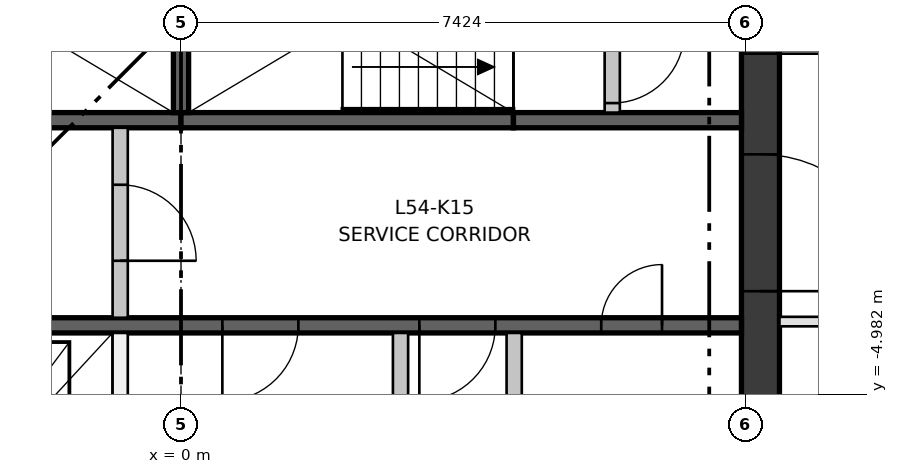
"""IFC4 building model, lengths in metres.
Left out: names, types, materials, properties, quantities, classifications, styles, units other than length and angle.
Written with IfcOpenShell. Run it as: python <this file> out.ifc"""

import sys

from ifc_helpers import new_model, si_unit, direction, frame, frame_2d, origin, place, context, subcontext, project, spatial, rectangle, extrude, element, fill, save


model = new_model("IFC4")
c1 = context("Model", 3, precision=1e-05, world=origin(), true_north=direction((0.0, 1.0)))
c2 = subcontext(c1, "Body", "Model", "MODEL_VIEW")
j1 = project(units=[si_unit("LENGTHUNIT", "METRE"), si_unit("PLANEANGLEUNIT", "RADIAN")], contexts=[c1])
p1 = place(None, origin())
s1 = spatial("IfcSite", under=j1, at=p1, CompositionType="ELEMENT")
p2 = place(p1, origin())
s2 = spatial("IfcBuilding", under=s1, at=p2, CompositionType="ELEMENT")
p3 = place(p2, frame((0.0, 0.0, 201.05)))
s3 = spatial("IfcBuildingStorey", under=s2, at=p3, CompositionType="ELEMENT", Elevation=201.05)
p4 = place(p3, frame((7.624, -7.374, 0.0), z_axis=(0.0, 0.0, 1.0), x_axis=(0.0, 1.0, 0.0)))
e1 = element("IfcWall", 1, at=p4, inside=s3, PredefinedType="SHEAR", context=c2, shape_type="SweptSolid", body=[
    extrude(rectangle(XDim=14.748, YDim=0.5, at=frame_2d((7.374, 0.0))), origin(), (0.0, 0.0, 1.0), 3.35),
])
p5 = place(p4, frame((6.874, 0.0, 0.0)))
e2 = element("IfcOpeningElement", 2, at=p5, cuts=e1, PredefinedType="OPENING", context=c2, shape_type="SweptSolid", body=[
    extrude(rectangle(XDim=1.0, YDim=2.1, at=frame_2d((0.5, 1.05))), frame((0.0, 0.26, 0.0), z_axis=(0.0, -1.0, 0.0), x_axis=(1.0, 0.0, 0.0)), (0.0, 0.0, 1.0), 0.52),
])
p6 = place(p4, frame((3.75, 0.0, 0.0)))
e3 = element("IfcOpeningElement", 3, at=p6, cuts=e1, PredefinedType="OPENING", context=c2, shape_type="SweptSolid", body=[
    extrude(rectangle(XDim=1.8, YDim=2.1, at=frame_2d((0.9, 1.05))), frame((0.0, 0.26, 0.0), z_axis=(0.0, -1.0, 0.0), x_axis=(1.0, 0.0, 0.0)), (0.0, 0.0, 1.0), 0.52),
])
p7 = place(p4, frame((9.198, 0.0, 0.0)))
e4 = element("IfcOpeningElement", 4, at=p7, cuts=e1, PredefinedType="OPENING", context=c2, shape_type="SweptSolid", body=[
    extrude(rectangle(XDim=1.8, YDim=2.1, at=frame_2d((0.9, 1.05))), frame((0.0, 0.26, 0.0), z_axis=(0.0, -1.0, 0.0), x_axis=(1.0, 0.0, 0.0)), (0.0, 0.0, 1.0), 0.52),
])
p8 = place(p3, frame((-7.374, -4.074, 0.0), z_axis=(0.0, 0.0, 1.0), x_axis=(1.0, 0.0, 0.0)))
e5 = element("IfcWall", 5, at=p8, inside=s3, PredefinedType="SHEAR", context=c2, shape_type="SweptSolid", body=[
    extrude(rectangle(XDim=14.748, YDim=0.2, at=frame_2d((7.374, 0.0))), origin(), (0.0, 0.0, 1.0), 3.0),
])
p9 = place(p8, frame((1.319, 0.0, 0.0)))
e6 = element("IfcOpeningElement", 6, at=p9, cuts=e5, PredefinedType="OPENING", context=c2, shape_type="SweptSolid", body=[
    extrude(rectangle(XDim=1.1, YDim=2.1, at=frame_2d((0.55, 1.05))), frame((0.0, 0.11, 0.0), z_axis=(0.0, -1.0, 0.0), x_axis=(1.0, 0.0, 0.0)), (0.0, 0.0, 1.0), 0.22),
])
p10 = place(p8, frame((4.456, 0.0, 0.0)))
e7 = element("IfcOpeningElement", 7, at=p10, cuts=e5, PredefinedType="OPENING", context=c2, shape_type="SweptSolid", body=[
    extrude(rectangle(XDim=1.1, YDim=2.1, at=frame_2d((0.55, 1.05))), frame((0.0, 0.11, 0.0), z_axis=(0.0, -1.0, 0.0), x_axis=(1.0, 0.0, 0.0)), (0.0, 0.0, 1.0), 0.22),
])
p11 = place(p8, frame((7.918, 0.0, 0.0)))
e8 = element("IfcOpeningElement", 8, at=p11, cuts=e5, PredefinedType="OPENING", context=c2, shape_type="SweptSolid", body=[
    extrude(rectangle(XDim=1.0, YDim=2.1, at=frame_2d((0.5, 1.05))), frame((0.0, 0.11, 0.0), z_axis=(0.0, -1.0, 0.0), x_axis=(1.0, 0.0, 0.0)), (0.0, 0.0, 1.0), 0.22),
])
p12 = place(p8, frame((10.51, 0.0, 0.0)))
e9 = element("IfcOpeningElement", 9, at=p12, cuts=e5, PredefinedType="OPENING", context=c2, shape_type="SweptSolid", body=[
    extrude(rectangle(XDim=1.0, YDim=2.1, at=frame_2d((0.5, 1.05))), frame((0.0, 0.11, 0.0), z_axis=(0.0, -1.0, 0.0), x_axis=(1.0, 0.0, 0.0)), (0.0, 0.0, 1.0), 0.22),
])
p13 = place(p8, frame((12.903, 0.0, 0.0)))
e10 = element("IfcOpeningElement", 10, at=p13, cuts=e5, PredefinedType="OPENING", context=c2, shape_type="SweptSolid", body=[
    extrude(rectangle(XDim=0.8, YDim=2.1, at=frame_2d((0.4, 1.05))), frame((0.0, 0.11, 0.0), z_axis=(0.0, -1.0, 0.0), x_axis=(1.0, 0.0, 0.0)), (0.0, 0.0, 1.0), 0.22),
])
for number, where, z_axis, x_axis in (
    (11, (-4.374, -1.375, 0.0), (0.0, 0.0, 1.0), (1.0, 0.0, 0.0)),
    (12, (0.0, -1.375, 0.0), (0.0, 0.0, 1.0), (1.0, 0.0, 0.0)),
):
    element("IfcWall", number, at=place(p3, frame(where, z_axis=z_axis, x_axis=x_axis)), inside=s3, PredefinedType="SHEAR", context=c2, shape_type="SweptSolid", body=[
        extrude(rectangle(XDim=4.374, YDim=0.2, at=frame_2d((2.187, 0.0))), origin(), (0.0, 0.0, 1.0), 3.0),
    ])
p14 = place(p3, frame((4.374, -1.375, 0.0), z_axis=(0.0, 0.0, 1.0), x_axis=(1.0, 0.0, 0.0)))
e13 = element("IfcWall", 13, at=p14, inside=s3, PredefinedType="SHEAR", context=c2, shape_type="SweptSolid", body=[
    extrude(rectangle(XDim=3.0, YDim=0.2, at=frame_2d((1.5, 0.0))), origin(), (0.0, 0.0, 1.0), 3.0),
])
p15 = place(p3, frame((0.0, -1.275, 0.0), z_axis=(0.0, 0.0, 1.0), x_axis=(0.0, 1.0, 0.0)))
e14 = element("IfcWall", 14, at=p15, inside=s3, PredefinedType="SHEAR", context=c2, shape_type="SweptSolid", body=[
    extrude(rectangle(XDim=2.55, YDim=0.2, at=frame_2d((1.275, 0.0))), origin(), (0.0, 0.0, 1.0), 3.0),
])
p16 = place(p3, frame((-0.8, -7.374, 0.0), z_axis=(0.0, 0.0, 1.0), x_axis=(0.0, 1.0, 0.0)))
e15 = element("IfcWall", 15, at=p16, inside=s3, PredefinedType="PARTITIONING", context=c2, shape_type="SweptSolid", body=[
    extrude(rectangle(XDim=3.2, YDim=0.2, at=frame_2d((1.6, 0.0))), origin(), (0.0, 0.0, 1.0), 3.0),
])
p17 = place(p3, frame((-0.8, -3.974, 0.0), z_axis=(0.0, 0.0, 1.0), x_axis=(0.0, 1.0, 0.0)))
e16 = element("IfcWall", 16, at=p17, inside=s3, PredefinedType="PARTITIONING", context=c2, shape_type="SweptSolid", body=[
    extrude(rectangle(XDim=2.499, YDim=0.2, at=frame_2d((1.25, 0.0))), origin(), (0.0, 0.0, 1.0), 3.0),
])
p18 = place(p17, frame((0.75, 0.0, 0.0)))
e17 = element("IfcOpeningElement", 17, at=p18, cuts=e16, PredefinedType="OPENING", context=c2, shape_type="SweptSolid", body=[
    extrude(rectangle(XDim=1.0, YDim=2.1, at=frame_2d((0.5, 1.05))), frame((0.0, 0.11, 0.0), z_axis=(0.0, -1.0, 0.0), x_axis=(1.0, 0.0, 0.0)), (0.0, 0.0, 1.0), 0.22),
])
for number, where, z_axis, x_axis in (
    (18, (2.888, -7.374, 0.0), (0.0, 0.0, 1.0), (0.0, 1.0, 0.0)),
    (19, (4.384, -7.374, 0.0), (0.0, 0.0, 1.0), (0.0, 1.0, 0.0)),
):
    element("IfcWall", number, at=place(p3, frame(where, z_axis=z_axis, x_axis=x_axis)), inside=s3, PredefinedType="PARTITIONING", context=c2, shape_type="SweptSolid", body=[
        extrude(rectangle(XDim=3.2, YDim=0.2, at=frame_2d((1.6, 0.0))), origin(), (0.0, 0.0, 1.0), 3.0),
    ])
p19 = place(p3, frame((5.674, -1.275, 0.0), z_axis=(0.0, 0.0, 1.0), x_axis=(0.0, 1.0, 0.0)))
e20 = element("IfcWall", 20, at=p19, inside=s3, PredefinedType="PARTITIONING", context=c2, shape_type="SweptSolid", body=[
    extrude(rectangle(XDim=2.55, YDim=0.2, at=frame_2d((1.275, 0.0))), origin(), (0.0, 0.0, 1.0), 3.0),
])
p20 = place(p19, frame((0.125, 0.0, 0.0)))
e21 = element("IfcOpeningElement", 21, at=p20, cuts=e20, PredefinedType="OPENING", context=c2, shape_type="SweptSolid", body=[
    extrude(rectangle(XDim=0.95, YDim=2.1, at=frame_2d((0.475, 1.05))), frame((0.0, 0.11, 0.0), z_axis=(0.0, -1.0, 0.0), x_axis=(1.0, 0.0, 0.0)), (0.0, 0.0, 1.0), 0.22),
])
p21 = place(p19, frame((1.475, 0.0, 0.0)))
e22 = element("IfcOpeningElement", 22, at=p21, cuts=e20, PredefinedType="OPENING", context=c2, shape_type="SweptSolid", body=[
    extrude(rectangle(XDim=0.95, YDim=2.1, at=frame_2d((0.475, 1.05))), frame((0.0, 0.11, 0.0), z_axis=(0.0, -1.0, 0.0), x_axis=(1.0, 0.0, 0.0)), (0.0, 0.0, 1.0), 0.22),
])
p22 = place(p3, frame((12.404, -4.024, 0.0), z_axis=(0.0, 0.0, 1.0), x_axis=(-1.0, 0.0, 0.0)))
e23 = element("IfcWall", 23, at=p22, inside=s3, PredefinedType="PARTITIONING", context=c2, shape_type="SweptSolid", body=[
    extrude(rectangle(XDim=4.53, YDim=0.125, at=frame_2d((2.265, 0.0))), origin(), (0.0, 0.0, 1.0), 3.0),
])
p23 = place(p22, frame((1.4, 0.0, 0.0)))
e24 = element("IfcOpeningElement", 24, at=p23, cuts=e23, PredefinedType="OPENING", context=c2, shape_type="SweptSolid", body=[
    extrude(rectangle(XDim=1.8, YDim=2.1, at=frame_2d((0.9, 1.05))), frame((0.0, 0.073, 0.0), z_axis=(0.0, -1.0, 0.0), x_axis=(1.0, 0.0, 0.0)), (0.0, 0.0, 1.0), 0.145),
])
p24 = place(p20, frame((0.95, 0.0, 0.0), z_axis=(0.0, 0.0, 1.0), x_axis=(-1.0, 0.0, 0.0)))
e25 = element("IfcDoor", 25, at=p24, inside=s3, OperationType="SINGLE_SWING_RIGHT", PredefinedType="DOOR", context=c2, shape_type="SweptSolid", body=[
    extrude(rectangle(XDim=0.95, YDim=2.1, at=frame_2d((0.475, 1.05))), frame((0.0, 0.025, 0.0), z_axis=(0.0, -1.0, 0.0), x_axis=(1.0, 0.0, 0.0)), (0.0, 0.0, 1.0), 0.05),
])
fill(e21, e25)
p25 = place(p18, frame((1.0, 0.0, 0.0), z_axis=(0.0, 0.0, 1.0), x_axis=(-1.0, 0.0, 0.0)))
e26 = element("IfcDoor", 26, at=p25, inside=s3, OperationType="SINGLE_SWING_LEFT", PredefinedType="DOOR", context=c2, shape_type="SweptSolid", body=[
    extrude(rectangle(XDim=1.0, YDim=2.1, at=frame_2d((0.5, 1.05))), frame((0.0, 0.025, 0.0), z_axis=(0.0, -1.0, 0.0), x_axis=(1.0, 0.0, 0.0)), (0.0, 0.0, 1.0), 0.05),
])
fill(e17, e26)
p26 = place(p11, frame((1.0, 0.0, 0.0), z_axis=(0.0, 0.0, 1.0), x_axis=(-1.0, 0.0, 0.0)))
e27 = element("IfcDoor", 27, at=p26, inside=s3, OperationType="SINGLE_SWING_LEFT", PredefinedType="DOOR", context=c2, shape_type="SweptSolid", body=[
    extrude(rectangle(XDim=1.0, YDim=2.1, at=frame_2d((0.5, 1.05))), frame((0.0, 0.025, 0.0), z_axis=(0.0, -1.0, 0.0), x_axis=(1.0, 0.0, 0.0)), (0.0, 0.0, 1.0), 0.05),
])
fill(e8, e27)
p27 = place(p12, frame((1.0, 0.0, 0.0), z_axis=(0.0, 0.0, 1.0), x_axis=(-1.0, 0.0, 0.0)))
e28 = element("IfcDoor", 28, at=p27, inside=s3, OperationType="SINGLE_SWING_LEFT", PredefinedType="DOOR", context=c2, shape_type="SweptSolid", body=[
    extrude(rectangle(XDim=1.0, YDim=2.1, at=frame_2d((0.5, 1.05))), frame((0.0, 0.025, 0.0), z_axis=(0.0, -1.0, 0.0), x_axis=(1.0, 0.0, 0.0)), (0.0, 0.0, 1.0), 0.05),
])
fill(e9, e28)
p28 = place(p13, origin())
e29 = element("IfcDoor", 29, at=p28, inside=s3, OperationType="SINGLE_SWING_RIGHT", PredefinedType="DOOR", context=c2, shape_type="SweptSolid", body=[
    extrude(rectangle(XDim=0.8, YDim=2.1, at=frame_2d((0.4, 1.05))), frame((0.0, 0.025, 0.0), z_axis=(0.0, -1.0, 0.0), x_axis=(1.0, 0.0, 0.0)), (0.0, 0.0, 1.0), 0.05),
])
fill(e10, e29)
p29 = place(p5, frame((1.0, 0.0, 0.0), z_axis=(0.0, 0.0, 1.0), x_axis=(-1.0, 0.0, 0.0)))
e30 = element("IfcDoor", 30, at=p29, inside=s3, OperationType="SINGLE_SWING_LEFT", PredefinedType="DOOR", context=c2, shape_type="SweptSolid", body=[
    extrude(rectangle(XDim=1.0, YDim=2.1, at=frame_2d((0.5, 1.05))), frame((0.0, 0.25, 0.0), z_axis=(0.0, -1.0, 0.0), x_axis=(1.0, 0.0, 0.0)), (0.0, 0.0, 1.0), 0.05),
])
fill(e2, e30)
p30 = place(p6, frame((1.8, 0.0, 0.0), z_axis=(0.0, 0.0, 1.0), x_axis=(-1.0, 0.0, 0.0)))
e31 = element("IfcDoor", 31, at=p30, inside=s3, OperationType="DOUBLE_DOOR_SINGLE_SWING", PredefinedType="DOOR", context=c2, shape_type="SweptSolid", body=[
    extrude(rectangle(XDim=1.8, YDim=2.1, at=frame_2d((0.9, 1.05))), frame((0.0, 0.025, 0.0), z_axis=(0.0, -1.0, 0.0), x_axis=(1.0, 0.0, 0.0)), (0.0, 0.0, 1.0), 0.05),
])
fill(e3, e31)
save(model, sys.argv[1])
